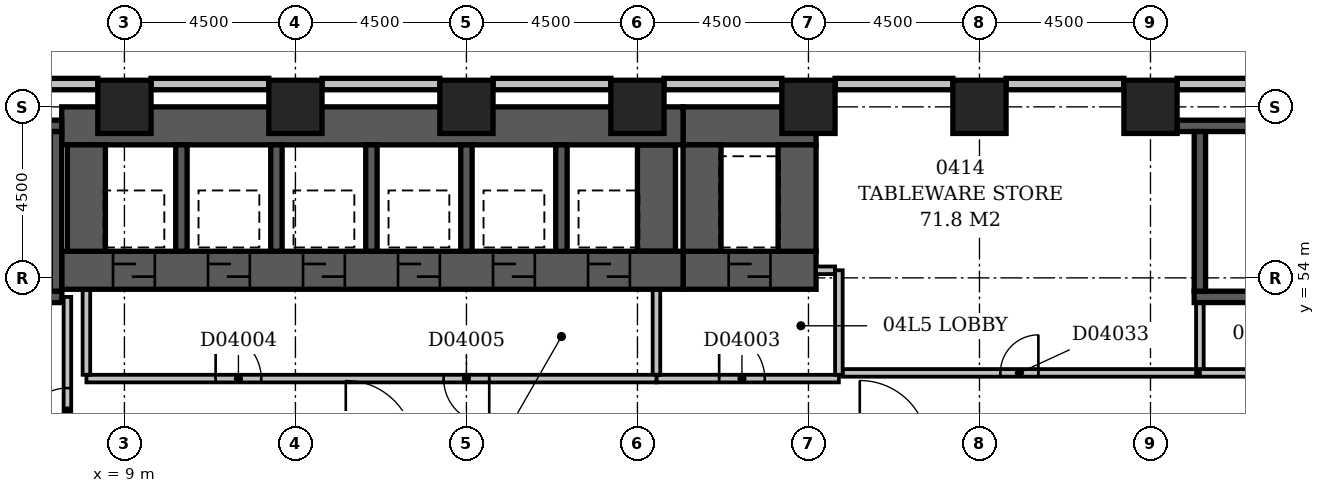
"""IFC4 building model, lengths in metres.
Left out: names, types, materials, properties, quantities, classifications, styles, units other than length and angle.
Written with IfcOpenShell. Run it as: python <this file> out.ifc"""

import sys

from ifc_helpers import new_model, si_unit, direction, frame, frame_2d, origin, origin_2d, place, context, subcontext, project, spatial, rectangle, extrude, element, fill, save


model = new_model("IFC4")
c1 = context("Model", 3, precision=1e-05, world=origin(), true_north=direction((0.0, 1.0)))
c2 = subcontext(c1, "Body", "Model", "MODEL_VIEW")
j1 = project(units=[si_unit("LENGTHUNIT", "METRE"), si_unit("PLANEANGLEUNIT", "RADIAN")], contexts=[c1])
p1 = place(None, origin())
s1 = spatial("IfcSite", under=j1, at=p1, CompositionType="ELEMENT")
p2 = place(p1, origin())
s2 = spatial("IfcBuilding", under=s1, at=p2, CompositionType="ELEMENT")
p3 = place(p2, frame((0.0, 0.0, 24.0)))
s3 = spatial("IfcBuildingStorey", under=s2, at=p3, CompositionType="ELEMENT", Elevation=24.0)
p4 = place(p3, frame((0.35, 53.5, -0.45), z_axis=(0.0, 0.0, 1.0), x_axis=(1.0, 0.0, 0.0)))
e1 = element("IfcWall", 1, at=p4, inside=s3, PredefinedType="SHEAR", context=c2, shape_type="SweptSolid", body=[
    extrude(rectangle(XDim=7.0, YDim=0.3, at=frame_2d((3.5, 0.0))), origin(), (0.0, 0.0, 1.0), 5.15),
])
p5 = place(p4, frame((5.58, 0.0, 0.45)))
e2 = element("IfcOpeningElement", 2, at=p5, cuts=e1, PredefinedType="OPENING", context=c2, shape_type="SweptSolid", body=[
    extrude(rectangle(XDim=1.1, YDim=2.1, at=frame_2d((0.55, 1.05))), frame((0.0, 0.162, 0.0), z_axis=(0.0, -1.0, 0.0), x_axis=(1.0, 0.0, 0.0)), (0.0, 0.0, 1.0), 0.324),
])
p6 = place(p3, frame((0.35, 58.0, -0.45), z_axis=(0.0, 0.0, 1.0), x_axis=(1.0, 0.0, 0.0)))
e3 = element("IfcWall", 3, at=p6, inside=s3, PredefinedType="SHEAR", context=c2, shape_type="SweptSolid", body=[
    extrude(rectangle(XDim=7.0, YDim=0.3, at=frame_2d((3.5, 0.0))), origin(), (0.0, 0.0, 1.0), 5.15),
])
p7 = place(p3, frame((7.2, 53.65, -0.45), z_axis=(0.0, 0.0, 1.0), x_axis=(0.0, 1.0, 0.0)))
e4 = element("IfcWall", 4, at=p7, inside=s3, PredefinedType="SHEAR", context=c2, shape_type="SweptSolid", body=[
    extrude(rectangle(XDim=4.2, YDim=0.3, at=frame_2d((2.1, 0.0))), origin(), (0.0, 0.0, 1.0), 5.15),
])
p8 = place(p3, frame((7.35, 54.2, -0.45), z_axis=(0.0, 0.0, 1.0), x_axis=(1.0, 0.0, 0.0)))
e5 = element("IfcWall", 5, at=p8, inside=s3, PredefinedType="SHEAR", context=c2, shape_type="SweptSolid", body=[
    extrude(rectangle(XDim=16.35, YDim=1.0, at=frame_2d((8.175, 0.0))), origin(), (0.0, 0.0, 1.0), 5.15),
])
p9 = place(p8, frame((1.35, 0.0, 0.45)))
e6 = element("IfcOpeningElement", 6, at=p9, cuts=e5, PredefinedType="OPENING", context=c2, shape_type="SweptSolid", body=[
    extrude(rectangle(XDim=1.1, YDim=2.1, at=frame_2d((0.55, 1.05))), frame((0.0, 0.512, 0.0), z_axis=(0.0, -1.0, 0.0), x_axis=(1.0, 0.0, 0.0)), (0.0, 0.0, 1.0), 1.024),
])
p10 = place(p8, frame((3.85, 0.0, 0.45)))
e7 = element("IfcOpeningElement", 7, at=p10, cuts=e5, PredefinedType="OPENING", context=c2, shape_type="SweptSolid", body=[
    extrude(rectangle(XDim=1.1, YDim=2.1, at=frame_2d((0.55, 1.05))), frame((0.0, 0.512, 0.0), z_axis=(0.0, -1.0, 0.0), x_axis=(1.0, 0.0, 0.0)), (0.0, 0.0, 1.0), 1.024),
])
p11 = place(p8, frame((6.35, 0.0, 0.45)))
e8 = element("IfcOpeningElement", 8, at=p11, cuts=e5, PredefinedType="OPENING", context=c2, shape_type="SweptSolid", body=[
    extrude(rectangle(XDim=1.1, YDim=2.1, at=frame_2d((0.55, 1.05))), frame((0.0, 0.512, 0.0), z_axis=(0.0, -1.0, 0.0), x_axis=(1.0, 0.0, 0.0)), (0.0, 0.0, 1.0), 1.024),
])
p12 = place(p8, frame((8.85, 0.0, 0.45)))
e9 = element("IfcOpeningElement", 9, at=p12, cuts=e5, PredefinedType="OPENING", context=c2, shape_type="SweptSolid", body=[
    extrude(rectangle(XDim=1.1, YDim=2.1, at=frame_2d((0.55, 1.05))), frame((0.0, 0.512, 0.0), z_axis=(0.0, -1.0, 0.0), x_axis=(1.0, 0.0, 0.0)), (0.0, 0.0, 1.0), 1.024),
])
p13 = place(p8, frame((11.35, 0.0, 0.45)))
e10 = element("IfcOpeningElement", 10, at=p13, cuts=e5, PredefinedType="OPENING", context=c2, shape_type="SweptSolid", body=[
    extrude(rectangle(XDim=1.1, YDim=2.1, at=frame_2d((0.55, 1.05))), frame((0.0, 0.512, 0.0), z_axis=(0.0, -1.0, 0.0), x_axis=(1.0, 0.0, 0.0)), (0.0, 0.0, 1.0), 1.024),
])
p14 = place(p8, frame((13.85, 0.0, 0.45)))
e11 = element("IfcOpeningElement", 11, at=p14, cuts=e5, PredefinedType="OPENING", context=c2, shape_type="SweptSolid", body=[
    extrude(rectangle(XDim=1.1, YDim=2.1, at=frame_2d((0.55, 1.05))), frame((0.0, 0.512, 0.0), z_axis=(0.0, -1.0, 0.0), x_axis=(1.0, 0.0, 0.0)), (0.0, 0.0, 1.0), 1.024),
])
p15 = place(p3, frame((7.35, 58.0, -0.45), z_axis=(0.0, 0.0, 1.0), x_axis=(1.0, 0.0, 0.0)))
e12 = element("IfcWall", 12, at=p15, inside=s3, PredefinedType="SHEAR", context=c2, shape_type="SweptSolid", body=[
    extrude(rectangle(XDim=16.35, YDim=1.0, at=frame_2d((8.175, 0.0))), origin(), (0.0, 0.0, 1.0), 5.15),
])
p16 = place(p3, frame((8.0, 54.7, -0.45), z_axis=(0.0, 0.0, 1.0), x_axis=(0.0, 1.0, 0.0)))
e13 = element("IfcWall", 13, at=p16, inside=s3, PredefinedType="SHEAR", context=c2, shape_type="SweptSolid", body=[
    extrude(rectangle(XDim=2.8, YDim=1.0, at=frame_2d((1.4, 0.0))), origin(), (0.0, 0.0, 1.0), 5.15),
])
for number, where, z_axis, x_axis in (
    (14, (10.5, 54.7, -0.45), (0.0, 0.0, 1.0), (0.0, 1.0, 0.0)),
    (15, (13.0, 54.7, -0.45), (0.0, 0.0, 1.0), (0.0, 1.0, 0.0)),
    (16, (15.5, 54.7, -0.45), (0.0, 0.0, 1.0), (0.0, 1.0, 0.0)),
    (17, (18.0, 54.7, -0.45), (0.0, 0.0, 1.0), (0.0, 1.0, 0.0)),
    (18, (20.5, 54.7, -0.45), (0.0, 0.0, 1.0), (0.0, 1.0, 0.0)),
):
    element("IfcWall", number, at=place(p3, frame(where, z_axis=z_axis, x_axis=x_axis)), inside=s3, PredefinedType="SHEAR", context=c2, shape_type="SweptSolid", body=[
        extrude(rectangle(XDim=2.8, YDim=0.3, at=frame_2d((1.4, 0.0))), origin(), (0.0, 0.0, 1.0), 5.15),
    ])
p17 = place(p3, frame((23.0, 54.7, -0.45), z_axis=(0.0, 0.0, 1.0), x_axis=(0.0, 1.0, 0.0)))
e19 = element("IfcWall", 19, at=p17, inside=s3, PredefinedType="SHEAR", context=c2, shape_type="SweptSolid", body=[
    extrude(rectangle(XDim=2.8, YDim=1.0, at=frame_2d((1.4, 0.0))), origin(), (0.0, 0.0, 1.0), 5.15),
])
p18 = place(p3, frame((23.7, 54.2, -0.45), z_axis=(0.0, 0.0, 1.0), x_axis=(1.0, 0.0, 0.0)))
e20 = element("IfcWall", 20, at=p18, inside=s3, PredefinedType="SHEAR", context=c2, shape_type="SweptSolid", body=[
    extrude(rectangle(XDim=3.5, YDim=1.0, at=frame_2d((1.75, 0.0))), origin(), (0.0, 0.0, 1.0), 5.15),
])
p19 = place(p18, frame((1.2, 0.0, 0.45)))
e21 = element("IfcOpeningElement", 21, at=p19, cuts=e20, PredefinedType="OPENING", context=c2, shape_type="SweptSolid", body=[
    extrude(rectangle(XDim=1.1, YDim=2.1, at=frame_2d((0.55, 1.05))), frame((0.0, 0.512, 0.0), z_axis=(0.0, -1.0, 0.0), x_axis=(1.0, 0.0, 0.0)), (0.0, 0.0, 1.0), 1.024),
])
p20 = place(p3, frame((23.7, 58.0, -0.45), z_axis=(0.0, 0.0, 1.0), x_axis=(1.0, 0.0, 0.0)))
e22 = element("IfcWall", 22, at=p20, inside=s3, PredefinedType="SHEAR", context=c2, shape_type="SweptSolid", body=[
    extrude(rectangle(XDim=3.5, YDim=1.0, at=frame_2d((1.75, 0.0))), origin(), (0.0, 0.0, 1.0), 5.15),
])
for number, where, z_axis, x_axis in (
    (23, (24.2, 54.7, -0.45), (0.0, 0.0, 1.0), (0.0, 1.0, 0.0)),
    (24, (26.7, 54.7, -0.45), (0.0, 0.0, 1.0), (0.0, 1.0, 0.0)),
):
    element("IfcWall", number, at=place(p3, frame(where, z_axis=z_axis, x_axis=x_axis)), inside=s3, PredefinedType="SHEAR", context=c2, shape_type="SweptSolid", body=[
        extrude(rectangle(XDim=2.8, YDim=1.0, at=frame_2d((1.4, 0.0))), origin(), (0.0, 0.0, 1.0), 5.15),
    ])
p21 = place(p3, frame((36.7, 58.0, -0.45), z_axis=(0.0, 0.0, 1.0), x_axis=(1.0, 0.0, 0.0)))
e25 = element("IfcWall", 25, at=p21, inside=s3, PredefinedType="SHEAR", context=c2, shape_type="SweptSolid", body=[
    extrude(rectangle(XDim=7.6, YDim=0.3, at=frame_2d((3.8, 0.0))), origin(), (0.0, 0.0, 1.0), 5.15),
])
p22 = place(p3, frame((37.15, 53.5, -0.45), z_axis=(0.0, 0.0, 1.0), x_axis=(1.0, 0.0, 0.0)))
e26 = element("IfcWall", 26, at=p22, inside=s3, PredefinedType="SHEAR", context=c2, shape_type="SweptSolid", body=[
    extrude(rectangle(XDim=7.0, YDim=0.3, at=frame_2d((3.5, 0.0))), origin(), (0.0, 0.0, 1.0), 5.15),
])
p23 = place(p22, frame((5.58, 0.0, 0.45)))
e27 = element("IfcOpeningElement", 27, at=p23, cuts=e26, PredefinedType="OPENING", context=c2, shape_type="SweptSolid", body=[
    extrude(rectangle(XDim=1.1, YDim=2.1, at=frame_2d((0.55, 1.05))), frame((0.0, 0.162, 0.0), z_axis=(0.0, -1.0, 0.0), x_axis=(1.0, 0.0, 0.0)), (0.0, 0.0, 1.0), 0.324),
])
p24 = place(p3, frame((37.3, 53.65, -0.45), z_axis=(0.0, 0.0, 1.0), x_axis=(0.0, 1.0, 0.0)))
e28 = element("IfcWall", 28, at=p24, inside=s3, PredefinedType="SHEAR", context=c2, shape_type="SweptSolid", body=[
    extrude(rectangle(XDim=4.2, YDim=0.3, at=frame_2d((2.1, 0.0))), origin(), (0.0, 0.0, 1.0), 5.15),
])
for number, where, z_axis, x_axis in (
    (29, (9.0, 58.5, -0.45), (0.0, 0.0, 1.0), (1.0, 0.0, 0.0)),
    (30, (13.5, 58.5, -0.45), (0.0, 0.0, 1.0), (1.0, 0.0, 0.0)),
    (31, (18.0, 58.5, -0.45), (0.0, 0.0, 1.0), (1.0, 0.0, 0.0)),
    (32, (22.5, 58.5, -0.45), (0.0, 0.0, 1.0), (1.0, 0.0, 0.0)),
    (33, (27.0, 58.5, -0.45), (0.0, 0.0, 1.0), (1.0, 0.0, 0.0)),
    (34, (31.5, 58.5, -0.45), (0.0, 0.0, 1.0), (1.0, 0.0, 0.0)),
    (35, (36.0, 58.5, -0.45), (0.0, 0.0, 1.0), (1.0, 0.0, 0.0)),
):
    element("IfcColumn", number, at=place(p3, frame(where, z_axis=z_axis, x_axis=x_axis)), inside=s3, PredefinedType="COLUMN", context=c2, shape_type="SweptSolid", body=[
        extrude(rectangle(XDim=1.4, YDim=1.4, at=origin_2d()), origin(), (0.0, 0.0, 1.0), 5.15),
    ])
for number, where, z_axis, x_axis in (
    (36, (39.8, 59.1, 0.0), (0.0, 0.0, 1.0), (-1.0, 0.0, 0.0)),
    (37, (35.3, 59.1, 0.0), (0.0, 0.0, 1.0), (-1.0, 0.0, 0.0)),
    (38, (30.8, 59.1, 0.0), (0.0, 0.0, 1.0), (-1.0, 0.0, 0.0)),
    (39, (26.3, 59.1, 0.0), (0.0, 0.0, 1.0), (-1.0, 0.0, 0.0)),
    (40, (21.8, 59.1, 0.0), (0.0, 0.0, 1.0), (-1.0, 0.0, 0.0)),
    (41, (17.3, 59.1, 0.0), (0.0, 0.0, 1.0), (-1.0, 0.0, 0.0)),
    (42, (12.8, 59.1, 0.0), (0.0, 0.0, 1.0), (-1.0, 0.0, 0.0)),
    (43, (8.3, 59.1, 0.0), (0.0, 0.0, 1.0), (-1.0, 0.0, 0.0)),
):
    element("IfcWall", number, at=place(p3, frame(where, z_axis=z_axis, x_axis=x_axis)), inside=s3, PredefinedType="STANDARD", context=c2, shape_type="SweptSolid", body=[
        extrude(rectangle(XDim=3.1, YDim=0.3, at=frame_2d((1.55, 0.0))), origin(), (0.0, 0.0, 1.0), 4.1),
    ])
p25 = place(p3, frame((8.0, 51.35, 0.0), z_axis=(0.0, 0.0, 1.0), x_axis=(1.0, 0.0, 0.0)))
e44 = element("IfcWall", 44, at=p25, inside=s3, PredefinedType="PARTITIONING", context=c2, shape_type="SweptSolid", body=[
    extrude(rectangle(XDim=15.0, YDim=0.2, at=frame_2d((7.5, 0.0))), origin(), (0.0, 0.0, 1.0), 4.7),
])
p26 = place(p25, frame((3.4, 0.0, 0.0)))
e45 = element("IfcOpeningElement", 45, at=p26, cuts=e44, PredefinedType="OPENING", context=c2, shape_type="SweptSolid", body=[
    extrude(rectangle(XDim=1.2, YDim=2.1, at=frame_2d((0.6, 1.05))), frame((0.0, 0.112, 0.0), z_axis=(0.0, -1.0, 0.0), x_axis=(1.0, 0.0, 0.0)), (0.0, 0.0, 1.0), 0.224),
])
p27 = place(p25, frame((9.4, 0.0, 0.0)))
e46 = element("IfcOpeningElement", 46, at=p27, cuts=e44, PredefinedType="OPENING", context=c2, shape_type="SweptSolid", body=[
    extrude(rectangle(XDim=1.2, YDim=2.1, at=frame_2d((0.6, 1.05))), frame((0.0, 0.112, 0.0), z_axis=(0.0, -1.0, 0.0), x_axis=(1.0, 0.0, 0.0)), (0.0, 0.0, 1.0), 0.224),
])
for number, where, z_axis, x_axis in (
    (47, (23.0, 51.45, 0.0), (0.0, 0.0, 1.0), (0.0, 1.0, 0.0)),
    (48, (8.0, 51.45, 0.0), (0.0, 0.0, 1.0), (0.0, 1.0, 0.0)),
):
    element("IfcWall", number, at=place(p3, frame(where, z_axis=z_axis, x_axis=x_axis)), inside=s3, PredefinedType="PARTITIONING", context=c2, shape_type="SweptSolid", body=[
        extrude(rectangle(XDim=2.23, YDim=0.2, at=frame_2d((1.115, 0.0))), origin(), (0.0, 0.0, 1.0), 4.7),
    ])
p28 = place(p3, frame((23.0, 51.35, 0.0), z_axis=(0.0, 0.0, 1.0), x_axis=(1.0, 0.0, 0.0)))
e49 = element("IfcWall", 49, at=p28, inside=s3, PredefinedType="PARTITIONING", context=c2, shape_type="SweptSolid", body=[
    extrude(rectangle(XDim=4.8, YDim=0.2, at=frame_2d((2.4, 0.0))), origin(), (0.0, 0.0, 1.0), 4.7),
])
p29 = place(p28, frame((1.65, 0.0, 0.0)))
e50 = element("IfcOpeningElement", 50, at=p29, cuts=e49, PredefinedType="OPENING", context=c2, shape_type="SweptSolid", body=[
    extrude(rectangle(XDim=1.2, YDim=2.1, at=frame_2d((0.6, 1.05))), frame((0.0, 0.112, 0.0), z_axis=(0.0, -1.0, 0.0), x_axis=(1.0, 0.0, 0.0)), (0.0, 0.0, 1.0), 0.224),
])
p30 = place(p3, frame((27.8, 51.45, 0.0), z_axis=(0.0, 0.0, 1.0), x_axis=(0.0, 1.0, 0.0)))
e51 = element("IfcWall", 51, at=p30, inside=s3, PredefinedType="PARTITIONING", context=c2, shape_type="SweptSolid", body=[
    extrude(rectangle(XDim=2.75, YDim=0.2, at=frame_2d((1.375, 0.0))), origin(), (0.0, 0.0, 1.0), 4.7),
])
p31 = place(p3, frame((27.2, 54.2, 0.0), z_axis=(0.0, 0.0, 1.0), x_axis=(1.0, 0.0, 0.0)))
e52 = element("IfcWall", 52, at=p31, inside=s3, PredefinedType="PARTITIONING", context=c2, shape_type="SweptSolid", body=[
    extrude(rectangle(XDim=0.5, YDim=0.2, at=frame_2d((0.25, 0.0))), origin(), (0.0, 0.0, 1.0), 4.7),
])
p32 = place(p3, frame((7.5, 49.6, 0.0), z_axis=(0.0, 0.0, 1.0), x_axis=(0.0, 1.0, 0.0)))
e53 = element("IfcWall", 53, at=p32, inside=s3, PredefinedType="PARTITIONING", context=c2, shape_type="SweptSolid", body=[
    extrude(rectangle(XDim=3.9, YDim=0.2, at=frame_2d((1.95, 0.0))), origin(), (0.0, 0.0, 1.0), 4.7),
])
p33 = place(p32, frame((0.3, 0.0, 0.0)))
e54 = element("IfcOpeningElement", 54, at=p33, cuts=e53, PredefinedType="OPENING", context=c2, shape_type="SweptSolid", body=[
    extrude(rectangle(XDim=1.2, YDim=2.1, at=frame_2d((0.6, 1.05))), frame((0.0, 0.112, 0.0), z_axis=(0.0, -1.0, 0.0), x_axis=(1.0, 0.0, 0.0)), (0.0, 0.0, 1.0), 0.224),
])
p34 = place(p3, frame((37.3, 51.5, 0.0), z_axis=(0.0, 0.0, 1.0), x_axis=(1.0, 0.0, 0.0)))
e55 = element("IfcWall", 55, at=p34, inside=s3, PredefinedType="PARTITIONING", context=c2, shape_type="SweptSolid", body=[
    extrude(rectangle(XDim=6.7, YDim=0.2, at=frame_2d((3.35, 0.0))), origin(), (0.0, 0.0, 1.0), 4.7),
])
p35 = place(p34, frame((2.75, 0.0, 0.0)))
e56 = element("IfcOpeningElement", 56, at=p35, cuts=e55, PredefinedType="OPENING", context=c2, shape_type="SweptSolid", body=[
    extrude(rectangle(XDim=1.2, YDim=2.1, at=frame_2d((0.6, 1.05))), frame((0.0, 0.112, 0.0), z_axis=(0.0, -1.0, 0.0), x_axis=(1.0, 0.0, 0.0)), (0.0, 0.0, 1.0), 0.224),
])
p36 = place(p3, frame((37.3, 51.6, 0.0), z_axis=(0.0, 0.0, 1.0), x_axis=(0.0, 1.0, 0.0)))
e57 = element("IfcWall", 57, at=p36, inside=s3, PredefinedType="PARTITIONING", context=c2, shape_type="SweptSolid", body=[
    extrude(rectangle(XDim=1.73, YDim=0.2, at=frame_2d((0.865, 0.0))), origin(), (0.0, 0.0, 1.0), 4.7),
])
p37 = place(p3, frame((37.2, 51.5, 0.0), z_axis=(0.0, 0.0, 1.0), x_axis=(-1.0, 0.0, 0.0)))
e58 = element("IfcWall", 58, at=p37, inside=s3, PredefinedType="PARTITIONING", context=c2, shape_type="SweptSolid", body=[
    extrude(rectangle(XDim=9.3, YDim=0.2, at=frame_2d((4.65, 0.0))), origin(), (0.0, 0.0, 1.0), 4.7),
])
p38 = place(p37, frame((4.15, 0.0, 0.0)))
e59 = element("IfcOpeningElement", 59, at=p38, cuts=e58, PredefinedType="OPENING", context=c2, shape_type="SweptSolid", body=[
    extrude(rectangle(XDim=1.0, YDim=2.1, at=frame_2d((0.5, 1.05))), frame((0.0, 0.112, 0.0), z_axis=(0.0, -1.0, 0.0), x_axis=(1.0, 0.0, 0.0)), (0.0, 0.0, 1.0), 0.224),
])
p39 = place(p33, origin())
e60 = element("IfcDoor", 60, at=p39, inside=s3, OperationType="SINGLE_SWING_LEFT", PredefinedType="DOOR", context=c2, shape_type="SweptSolid", body=[
    extrude(rectangle(XDim=1.2, YDim=2.1, at=frame_2d((0.6, 1.05))), frame((0.0, 0.025, 0.0), z_axis=(0.0, -1.0, 0.0), x_axis=(1.0, 0.0, 0.0)), (0.0, 0.0, 1.0), 0.05),
])
fill(e54, e60)
p40 = place(p29, origin())
e61 = element("IfcDoor", 61, at=p40, inside=s3, OperationType="SINGLE_SWING_LEFT", PredefinedType="DOOR", context=c2, shape_type="SweptSolid", body=[
    extrude(rectangle(XDim=1.2, YDim=2.1, at=frame_2d((0.6, 1.05))), frame((0.0, 0.025, 0.0), z_axis=(0.0, -1.0, 0.0), x_axis=(1.0, 0.0, 0.0)), (0.0, 0.0, 1.0), 0.05),
])
fill(e50, e61)
p41 = place(p19, origin())
e62 = element("IfcDoor", 62, at=p41, inside=s3, OperationType="SLIDING_TO_LEFT", PredefinedType="DOOR", context=c2, shape_type="SweptSolid", body=[
    extrude(rectangle(XDim=1.1, YDim=2.1, at=frame_2d((0.55, 1.05))), frame((0.0, 0.025, 0.0), z_axis=(0.0, -1.0, 0.0), x_axis=(1.0, 0.0, 0.0)), (0.0, 0.0, 1.0), 0.05),
])
fill(e21, e62)
p42 = place(p9, origin())
e63 = element("IfcDoor", 63, at=p42, inside=s3, OperationType="SLIDING_TO_LEFT", PredefinedType="DOOR", context=c2, shape_type="SweptSolid", body=[
    extrude(rectangle(XDim=1.1, YDim=2.1, at=frame_2d((0.55, 1.05))), frame((0.0, 0.025, 0.0), z_axis=(0.0, -1.0, 0.0), x_axis=(1.0, 0.0, 0.0)), (0.0, 0.0, 1.0), 0.05),
])
fill(e6, e63)
p43 = place(p10, origin())
e64 = element("IfcDoor", 64, at=p43, inside=s3, OperationType="SLIDING_TO_LEFT", PredefinedType="DOOR", context=c2, shape_type="SweptSolid", body=[
    extrude(rectangle(XDim=1.1, YDim=2.1, at=frame_2d((0.55, 1.05))), frame((0.0, 0.025, 0.0), z_axis=(0.0, -1.0, 0.0), x_axis=(1.0, 0.0, 0.0)), (0.0, 0.0, 1.0), 0.05),
])
fill(e7, e64)
p44 = place(p11, origin())
e65 = element("IfcDoor", 65, at=p44, inside=s3, OperationType="SLIDING_TO_LEFT", PredefinedType="DOOR", context=c2, shape_type="SweptSolid", body=[
    extrude(rectangle(XDim=1.1, YDim=2.1, at=frame_2d((0.55, 1.05))), frame((0.0, 0.025, 0.0), z_axis=(0.0, -1.0, 0.0), x_axis=(1.0, 0.0, 0.0)), (0.0, 0.0, 1.0), 0.05),
])
fill(e8, e65)
p45 = place(p12, origin())
e66 = element("IfcDoor", 66, at=p45, inside=s3, OperationType="SLIDING_TO_LEFT", PredefinedType="DOOR", context=c2, shape_type="SweptSolid", body=[
    extrude(rectangle(XDim=1.1, YDim=2.1, at=frame_2d((0.55, 1.05))), frame((0.0, 0.025, 0.0), z_axis=(0.0, -1.0, 0.0), x_axis=(1.0, 0.0, 0.0)), (0.0, 0.0, 1.0), 0.05),
])
fill(e9, e66)
p46 = place(p13, origin())
e67 = element("IfcDoor", 67, at=p46, inside=s3, OperationType="SLIDING_TO_LEFT", PredefinedType="DOOR", context=c2, shape_type="SweptSolid", body=[
    extrude(rectangle(XDim=1.1, YDim=2.1, at=frame_2d((0.55, 1.05))), frame((0.0, 0.025, 0.0), z_axis=(0.0, -1.0, 0.0), x_axis=(1.0, 0.0, 0.0)), (0.0, 0.0, 1.0), 0.05),
])
fill(e10, e67)
p47 = place(p14, origin())
e68 = element("IfcDoor", 68, at=p47, inside=s3, OperationType="SLIDING_TO_LEFT", PredefinedType="DOOR", context=c2, shape_type="SweptSolid", body=[
    extrude(rectangle(XDim=1.1, YDim=2.1, at=frame_2d((0.55, 1.05))), frame((0.0, 0.025, 0.0), z_axis=(0.0, -1.0, 0.0), x_axis=(1.0, 0.0, 0.0)), (0.0, 0.0, 1.0), 0.05),
])
fill(e11, e68)
p48 = place(p26, origin())
e69 = element("IfcDoor", 69, at=p48, inside=s3, OperationType="SINGLE_SWING_LEFT", PredefinedType="DOOR", context=c2, shape_type="SweptSolid", body=[
    extrude(rectangle(XDim=1.2, YDim=2.1, at=frame_2d((0.6, 1.05))), frame((0.0, 0.025, 0.0), z_axis=(0.0, -1.0, 0.0), x_axis=(1.0, 0.0, 0.0)), (0.0, 0.0, 1.0), 0.05),
])
fill(e45, e69)
p49 = place(p27, origin())
e70 = element("IfcDoor", 70, at=p49, inside=s3, OperationType="SINGLE_SWING_RIGHT", PredefinedType="DOOR", context=c2, shape_type="SweptSolid", body=[
    extrude(rectangle(XDim=1.2, YDim=2.1, at=frame_2d((0.6, 1.05))), frame((0.0, 0.025, 0.0), z_axis=(0.0, -1.0, 0.0), x_axis=(1.0, 0.0, 0.0)), (0.0, 0.0, 1.0), 0.05),
])
fill(e46, e70)
p50 = place(p38, frame((1.0, 0.0, 0.0), z_axis=(0.0, 0.0, 1.0), x_axis=(-1.0, 0.0, 0.0)))
e71 = element("IfcDoor", 71, at=p50, inside=s3, OperationType="SINGLE_SWING_RIGHT", PredefinedType="DOOR", context=c2, shape_type="SweptSolid", body=[
    extrude(rectangle(XDim=1.0, YDim=2.1, at=frame_2d((0.5, 1.05))), frame((0.0, 0.025, 0.0), z_axis=(0.0, -1.0, 0.0), x_axis=(1.0, 0.0, 0.0)), (0.0, 0.0, 1.0), 0.05),
])
fill(e59, e71)
save(model, sys.argv[1])
